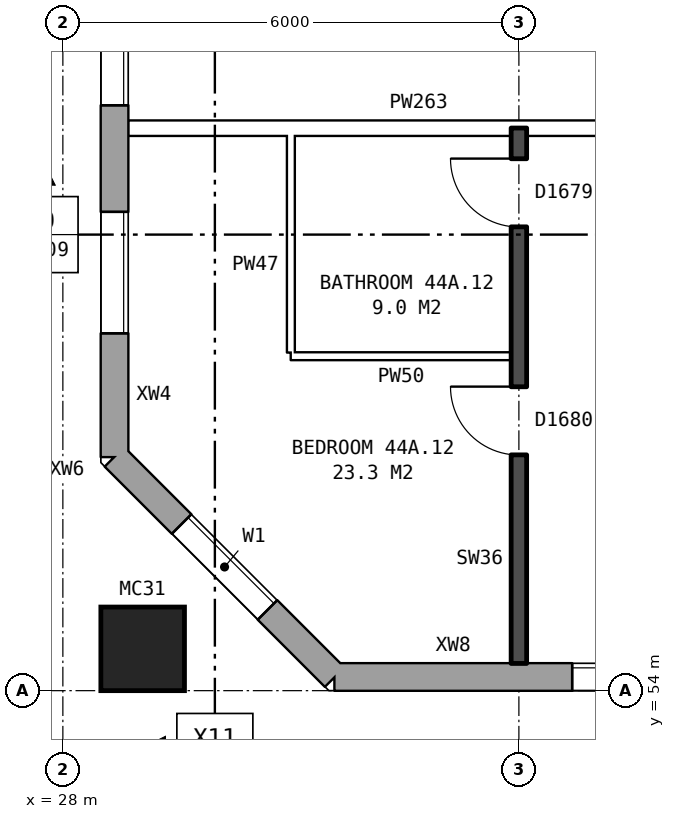
"""IFC4 building model, lengths in metres.
Left out: names, types, materials, properties, quantities, classifications, styles, units other than length and angle.
Written with IfcOpenShell. Run it as: python <this file> out.ifc"""

import sys

from ifc_helpers import new_model, si_unit, direction, frame, frame_2d, origin, origin_2d, place, context, subcontext, project, spatial, rectangle, hollow_rectangle, extrude, element, fill, save


model = new_model("IFC4")
c1 = context("Model", 3, precision=1e-05, world=origin(), true_north=direction((0.0, 1.0)))
c2 = subcontext(c1, "Body", "Model", "MODEL_VIEW")
j1 = project(units=[si_unit("LENGTHUNIT", "METRE"), si_unit("PLANEANGLEUNIT", "RADIAN")], contexts=[c1])
p1 = place(None, origin())
s1 = spatial("IfcSite", under=j1, at=p1, CompositionType="ELEMENT")
p2 = place(p1, origin())
s2 = spatial("IfcBuilding", under=s1, at=p2, CompositionType="ELEMENT")
p3 = place(p2, frame((0.0, 0.0, 157.8)))
s3 = spatial("IfcBuildingStorey", under=s2, at=p3, CompositionType="ELEMENT", Elevation=157.8)
p4 = place(p3, frame((29.05, 54.55, 0.0), z_axis=(0.0, 0.0, 1.0), x_axis=(1.0, 0.0, 0.0)))
e1 = element("IfcColumn", 1, at=p4, inside=s3, PredefinedType="COLUMN", context=c2, shape_type="SweptSolid", body=[
    extrude(hollow_rectangle(XDim=1.1, YDim=1.1, WallThickness=0.06, at=origin_2d()), origin(), (0.0, 0.0, 1.0), 3.1),
])
p5 = place(p3, frame((28.68, 57.075, 0.0), z_axis=(0.0, 0.0, 1.0), x_axis=(0.707106781187, -0.707106781187, 0.0)))
e2 = element("IfcWall", 2, at=p5, inside=s3, PredefinedType="STANDARD", context=c2, shape_type="SweptSolid", body=[
    extrude(rectangle(XDim=4.094, YDim=0.36, at=frame_2d((2.047, 0.0))), origin(), (0.0, 0.0, 1.0), 2.85),
])
p6 = place(p5, frame((1.247, 0.0, 0.8)))
e3 = element("IfcOpeningElement", 3, at=p6, cuts=e2, PredefinedType="OPENING", context=c2, shape_type="SweptSolid", body=[
    extrude(rectangle(XDim=1.6, YDim=1.8, at=frame_2d((0.8, 0.9))), frame((0.0, 0.19, 0.0), z_axis=(0.0, -1.0, 0.0), x_axis=(1.0, 0.0, 0.0)), (0.0, 0.0, 1.0), 0.38),
])
p7 = place(p3, frame((31.575, 54.18, 0.0), z_axis=(0.0, 0.0, 1.0), x_axis=(1.0, 0.0, 0.0)))
e4 = element("IfcWall", 4, at=p7, inside=s3, PredefinedType="STANDARD", context=c2, shape_type="SweptSolid", body=[
    extrude(rectangle(XDim=41.351, YDim=0.36, at=frame_2d((20.675, 0.0))), origin(), (0.0, 0.0, 1.0), 2.85),
])
p8 = place(p7, frame((3.125, 0.0, 0.8)))
e5 = element("IfcOpeningElement", 5, at=p8, cuts=e4, PredefinedType="OPENING", context=c2, shape_type="SweptSolid", body=[
    extrude(rectangle(XDim=1.6, YDim=1.8, at=frame_2d((0.8, 0.9))), frame((0.0, 0.19, 0.0), z_axis=(0.0, -1.0, 0.0), x_axis=(1.0, 0.0, 0.0)), (0.0, 0.0, 1.0), 0.38),
])
p9 = place(p7, frame((6.125, 0.0, 0.8)))
e6 = element("IfcOpeningElement", 6, at=p9, cuts=e4, PredefinedType="OPENING", context=c2, shape_type="SweptSolid", body=[
    extrude(rectangle(XDim=1.6, YDim=1.8, at=frame_2d((0.8, 0.9))), frame((0.0, 0.19, 0.0), z_axis=(0.0, -1.0, 0.0), x_axis=(1.0, 0.0, 0.0)), (0.0, 0.0, 1.0), 0.38),
])
p10 = place(p7, frame((8.625, 0.0, 0.8)))
e7 = element("IfcOpeningElement", 7, at=p10, cuts=e4, PredefinedType="OPENING", context=c2, shape_type="SweptSolid", body=[
    extrude(rectangle(XDim=1.0, YDim=1.8, at=frame_2d((0.5, 0.9))), frame((0.0, 0.19, 0.0), z_axis=(0.0, -1.0, 0.0), x_axis=(1.0, 0.0, 0.0)), (0.0, 0.0, 1.0), 0.38),
])
p11 = place(p7, frame((9.925, 0.0, 1.6)))
e8 = element("IfcOpeningElement", 8, at=p11, cuts=e4, PredefinedType="OPENING", context=c2, shape_type="SweptSolid", body=[
    extrude(rectangle(XDim=0.8, YDim=0.9, at=frame_2d((0.4, 0.45))), frame((0.0, 0.19, 0.0), z_axis=(0.0, -1.0, 0.0), x_axis=(1.0, 0.0, 0.0)), (0.0, 0.0, 1.0), 0.38),
])
p12 = place(p7, frame((15.125, 0.0, 0.8)))
e9 = element("IfcOpeningElement", 9, at=p12, cuts=e4, PredefinedType="OPENING", context=c2, shape_type="SweptSolid", body=[
    extrude(rectangle(XDim=1.6, YDim=1.8, at=frame_2d((0.8, 0.9))), frame((0.0, 0.19, 0.0), z_axis=(0.0, -1.0, 0.0), x_axis=(1.0, 0.0, 0.0)), (0.0, 0.0, 1.0), 0.38),
])
p13 = place(p7, frame((18.125, 0.0, 0.8)))
e10 = element("IfcOpeningElement", 10, at=p13, cuts=e4, PredefinedType="OPENING", context=c2, shape_type="SweptSolid", body=[
    extrude(rectangle(XDim=1.6, YDim=1.8, at=frame_2d((0.8, 0.9))), frame((0.0, 0.19, 0.0), z_axis=(0.0, -1.0, 0.0), x_axis=(1.0, 0.0, 0.0)), (0.0, 0.0, 1.0), 0.38),
])
p14 = place(p7, frame((21.125, 0.0, 0.8)))
e11 = element("IfcOpeningElement", 11, at=p14, cuts=e4, PredefinedType="OPENING", context=c2, shape_type="SweptSolid", body=[
    extrude(rectangle(XDim=1.6, YDim=1.8, at=frame_2d((0.8, 0.9))), frame((0.0, 0.19, 0.0), z_axis=(0.0, -1.0, 0.0), x_axis=(1.0, 0.0, 0.0)), (0.0, 0.0, 1.0), 0.38),
])
p15 = place(p7, frame((24.125, 0.0, 0.8)))
e12 = element("IfcOpeningElement", 12, at=p15, cuts=e4, PredefinedType="OPENING", context=c2, shape_type="SweptSolid", body=[
    extrude(rectangle(XDim=1.6, YDim=1.8, at=frame_2d((0.8, 0.9))), frame((0.0, 0.19, 0.0), z_axis=(0.0, -1.0, 0.0), x_axis=(1.0, 0.0, 0.0)), (0.0, 0.0, 1.0), 0.38),
])
p16 = place(p7, frame((26.625, 0.0, 0.8)))
e13 = element("IfcOpeningElement", 13, at=p16, cuts=e4, PredefinedType="OPENING", context=c2, shape_type="SweptSolid", body=[
    extrude(rectangle(XDim=1.4, YDim=1.8, at=frame_2d((0.7, 0.9))), frame((0.0, 0.19, 0.0), z_axis=(0.0, -1.0, 0.0), x_axis=(1.0, 0.0, 0.0)), (0.0, 0.0, 1.0), 0.38),
])
p17 = place(p7, frame((30.475, 0.0, 1.7)))
e14 = element("IfcOpeningElement", 14, at=p17, cuts=e4, PredefinedType="OPENING", context=c2, shape_type="SweptSolid", body=[
    extrude(rectangle(XDim=0.8, YDim=0.9, at=frame_2d((0.4, 0.45))), frame((0.0, 0.19, 0.0), z_axis=(0.0, -1.0, 0.0), x_axis=(1.0, 0.0, 0.0)), (0.0, 0.0, 1.0), 0.38),
])
p18 = place(p7, frame((33.125, 0.0, 0.8)))
e15 = element("IfcOpeningElement", 15, at=p18, cuts=e4, PredefinedType="OPENING", context=c2, shape_type="SweptSolid", body=[
    extrude(rectangle(XDim=1.6, YDim=1.8, at=frame_2d((0.8, 0.9))), frame((0.0, 0.19, 0.0), z_axis=(0.0, -1.0, 0.0), x_axis=(1.0, 0.0, 0.0)), (0.0, 0.0, 1.0), 0.38),
])
p19 = place(p7, frame((36.125, 0.0, 0.8)))
e16 = element("IfcOpeningElement", 16, at=p19, cuts=e4, PredefinedType="OPENING", context=c2, shape_type="SweptSolid", body=[
    extrude(rectangle(XDim=1.6, YDim=1.8, at=frame_2d((0.8, 0.9))), frame((0.0, 0.19, 0.0), z_axis=(0.0, -1.0, 0.0), x_axis=(1.0, 0.0, 0.0)), (0.0, 0.0, 1.0), 0.38),
])
p20 = place(p7, frame((39.125, 0.0, 0.8)))
e17 = element("IfcOpeningElement", 17, at=p20, cuts=e4, PredefinedType="OPENING", context=c2, shape_type="SweptSolid", body=[
    extrude(rectangle(XDim=1.6, YDim=1.8, at=frame_2d((0.8, 0.9))), frame((0.0, 0.19, 0.0), z_axis=(0.0, -1.0, 0.0), x_axis=(1.0, 0.0, 0.0)), (0.0, 0.0, 1.0), 0.38),
])
p21 = place(p7, frame((12.125, 0.0, 0.8)))
e18 = element("IfcOpeningElement", 18, at=p21, cuts=e4, PredefinedType="OPENING", context=c2, shape_type="SweptSolid", body=[
    extrude(rectangle(XDim=1.0, YDim=0.9, at=frame_2d((0.5, 0.45))), frame((0.0, 0.19, 0.0), z_axis=(0.0, -1.0, 0.0), x_axis=(1.0, 0.0, 0.0)), (0.0, 0.0, 1.0), 0.38),
])
p22 = place(p7, frame((13.425, 0.0, 0.8)))
e19 = element("IfcOpeningElement", 19, at=p22, cuts=e4, PredefinedType="OPENING", context=c2, shape_type="SweptSolid", body=[
    extrude(rectangle(XDim=0.8, YDim=1.8, at=frame_2d((0.4, 0.9))), frame((0.0, 0.19, 0.0), z_axis=(0.0, -1.0, 0.0), x_axis=(1.0, 0.0, 0.0)), (0.0, 0.0, 1.0), 0.38),
])
p23 = place(p7, frame((28.325, 0.0, 0.8)))
e20 = element("IfcOpeningElement", 20, at=p23, cuts=e4, PredefinedType="OPENING", context=c2, shape_type="SweptSolid", body=[
    extrude(rectangle(XDim=0.8, YDim=0.9, at=frame_2d((0.4, 0.45))), frame((0.0, 0.19, 0.0), z_axis=(0.0, -1.0, 0.0), x_axis=(1.0, 0.0, 0.0)), (0.0, 0.0, 1.0), 0.38),
])
p24 = place(p7, frame((31.625, 0.0, 0.8)))
e21 = element("IfcOpeningElement", 21, at=p24, cuts=e4, PredefinedType="OPENING", context=c2, shape_type="SweptSolid", body=[
    extrude(rectangle(XDim=0.6, YDim=1.8, at=frame_2d((0.3, 0.9))), frame((0.0, 0.19, 0.0), z_axis=(0.0, -1.0, 0.0), x_axis=(1.0, 0.0, 0.0)), (0.0, 0.0, 1.0), 0.38),
])
p25 = place(p3, frame((28.68, 82.925, 0.0), z_axis=(0.0, 0.0, 1.0), x_axis=(0.0, -1.0, 0.0)))
e22 = element("IfcWall", 22, at=p25, inside=s3, PredefinedType="STANDARD", context=c2, shape_type="SweptSolid", body=[
    extrude(rectangle(XDim=25.851, YDim=0.36, at=frame_2d((12.925, 0.0))), origin(), (0.0, 0.0, 1.0), 2.85),
])
p26 = place(p25, frame((1.625, 0.0, 0.8)))
e23 = element("IfcOpeningElement", 23, at=p26, cuts=e22, PredefinedType="OPENING", context=c2, shape_type="SweptSolid", body=[
    extrude(rectangle(XDim=1.6, YDim=1.8, at=frame_2d((0.8, 0.9))), frame((0.0, 0.19, 0.0), z_axis=(0.0, -1.0, 0.0), x_axis=(1.0, 0.0, 0.0)), (0.0, 0.0, 1.0), 0.38),
])
p27 = place(p25, frame((4.625, 0.0, 0.8)))
e24 = element("IfcOpeningElement", 24, at=p27, cuts=e22, PredefinedType="OPENING", context=c2, shape_type="SweptSolid", body=[
    extrude(rectangle(XDim=1.6, YDim=1.8, at=frame_2d((0.8, 0.9))), frame((0.0, 0.19, 0.0), z_axis=(0.0, -1.0, 0.0), x_axis=(1.0, 0.0, 0.0)), (0.0, 0.0, 1.0), 0.38),
])
p28 = place(p25, frame((6.525, 0.0, 0.8)))
e25 = element("IfcOpeningElement", 25, at=p28, cuts=e22, PredefinedType="OPENING", context=c2, shape_type="SweptSolid", body=[
    extrude(rectangle(XDim=1.6, YDim=1.5, at=frame_2d((0.8, 0.75))), frame((0.0, 0.19, 0.0), z_axis=(0.0, -1.0, 0.0), x_axis=(1.0, 0.0, 0.0)), (0.0, 0.0, 1.0), 0.38),
])
p29 = place(p25, frame((8.425, 0.0, 0.8)))
e26 = element("IfcOpeningElement", 26, at=p29, cuts=e22, PredefinedType="OPENING", context=c2, shape_type="SweptSolid", body=[
    extrude(rectangle(XDim=0.6, YDim=0.9, at=frame_2d((0.3, 0.45))), frame((0.0, 0.19, 0.0), z_axis=(0.0, -1.0, 0.0), x_axis=(1.0, 0.0, 0.0)), (0.0, 0.0, 1.0), 0.38),
])
p30 = place(p25, frame((10.225, 0.0, 1.7)))
e27 = element("IfcOpeningElement", 27, at=p30, cuts=e22, PredefinedType="OPENING", context=c2, shape_type="SweptSolid", body=[
    extrude(rectangle(XDim=1.2, YDim=0.9, at=frame_2d((0.6, 0.45))), frame((0.0, 0.19, 0.0), z_axis=(0.0, -1.0, 0.0), x_axis=(1.0, 0.0, 0.0)), (0.0, 0.0, 1.0), 0.38),
])
p31 = place(p25, frame((11.725, 0.0, 0.8)))
e28 = element("IfcOpeningElement", 28, at=p31, cuts=e22, PredefinedType="OPENING", context=c2, shape_type="SweptSolid", body=[
    extrude(rectangle(XDim=1.6, YDim=1.8, at=frame_2d((0.8, 0.9))), frame((0.0, 0.19, 0.0), z_axis=(0.0, -1.0, 0.0), x_axis=(1.0, 0.0, 0.0)), (0.0, 0.0, 1.0), 0.38),
])
p32 = place(p25, frame((19.625, 0.0, 0.8)))
e29 = element("IfcOpeningElement", 29, at=p32, cuts=e22, PredefinedType="OPENING", context=c2, shape_type="SweptSolid", body=[
    extrude(rectangle(XDim=1.6, YDim=1.8, at=frame_2d((0.8, 0.9))), frame((0.0, 0.19, 0.0), z_axis=(0.0, -1.0, 0.0), x_axis=(1.0, 0.0, 0.0)), (0.0, 0.0, 1.0), 0.38),
])
p33 = place(p25, frame((22.625, 0.0, 0.8)))
e30 = element("IfcOpeningElement", 30, at=p33, cuts=e22, PredefinedType="OPENING", context=c2, shape_type="SweptSolid", body=[
    extrude(rectangle(XDim=1.6, YDim=1.8, at=frame_2d((0.8, 0.9))), frame((0.0, 0.19, 0.0), z_axis=(0.0, -1.0, 0.0), x_axis=(1.0, 0.0, 0.0)), (0.0, 0.0, 1.0), 0.38),
])
p34 = place(p25, frame((13.625, 0.0, 1.1)))
e31 = element("IfcOpeningElement", 31, at=p34, cuts=e22, PredefinedType="OPENING", context=c2, shape_type="SweptSolid", body=[
    extrude(rectangle(XDim=1.0, YDim=1.5, at=frame_2d((0.5, 0.75))), frame((0.0, 0.19, 0.0), z_axis=(0.0, -1.0, 0.0), x_axis=(1.0, 0.0, 0.0)), (0.0, 0.0, 1.0), 0.38),
])
p35 = place(p25, frame((14.925, 0.0, 1.7)))
e32 = element("IfcOpeningElement", 32, at=p35, cuts=e22, PredefinedType="OPENING", context=c2, shape_type="SweptSolid", body=[
    extrude(rectangle(XDim=0.6, YDim=0.9, at=frame_2d((0.3, 0.45))), frame((0.0, 0.19, 0.0), z_axis=(0.0, -1.0, 0.0), x_axis=(1.0, 0.0, 0.0)), (0.0, 0.0, 1.0), 0.38),
])
p36 = place(p25, frame((16.675, 0.0, 0.8)))
e33 = element("IfcOpeningElement", 33, at=p36, cuts=e22, PredefinedType="OPENING", context=c2, shape_type="SweptSolid", body=[
    extrude(rectangle(XDim=0.6, YDim=0.9, at=frame_2d((0.3, 0.45))), frame((0.0, 0.19, 0.0), z_axis=(0.0, -1.0, 0.0), x_axis=(1.0, 0.0, 0.0)), (0.0, 0.0, 1.0), 0.38),
])
p37 = place(p25, frame((17.675, 0.0, 0.8)))
e34 = element("IfcOpeningElement", 34, at=p37, cuts=e22, PredefinedType="OPENING", context=c2, shape_type="SweptSolid", body=[
    extrude(rectangle(XDim=1.6, YDim=1.5, at=frame_2d((0.8, 0.75))), frame((0.0, 0.19, 0.0), z_axis=(0.0, -1.0, 0.0), x_axis=(1.0, 0.0, 0.0)), (0.0, 0.0, 1.0), 0.38),
])
p38 = place(p3, frame((31.0, 58.4, 0.0), z_axis=(0.0, 0.0, 1.0), x_axis=(1.0, 0.0, 0.0)))
e35 = element("IfcWall", 35, at=p38, inside=s3, PredefinedType="PARTITIONING", context=c2, shape_type="SweptSolid", body=[
    extrude(rectangle(XDim=2.9, YDim=0.1, at=frame_2d((1.45, 0.0))), origin(), (0.0, 0.0, 1.0), 2.85),
])
p39 = place(p3, frame((28.86, 61.4, 0.0), z_axis=(0.0, 0.0, 1.0), x_axis=(1.0, 0.0, 0.0)))
e36 = element("IfcWall", 36, at=p39, inside=s3, PredefinedType="PARTITIONING", context=c2, shape_type="SweptSolid", body=[
    extrude(rectangle(XDim=17.04, YDim=0.2, at=frame_2d((8.52, 0.0))), origin(), (0.0, 0.0, 1.0), 2.85),
])
p40 = place(p39, frame((14.59, 0.0, 0.0)))
e37 = element("IfcOpeningElement", 37, at=p40, cuts=e36, PredefinedType="OPENING", context=c2, shape_type="SweptSolid", body=[
    extrude(rectangle(XDim=1.0, YDim=2.1, at=frame_2d((0.5, 1.05))), frame((0.0, 0.11, 0.0), z_axis=(0.0, -1.0, 0.0), x_axis=(1.0, 0.0, 0.0)), (0.0, 0.0, 1.0), 0.22),
])
p41 = place(p39, frame((7.64, 0.0, 0.0)))
e38 = element("IfcOpeningElement", 38, at=p41, cuts=e36, PredefinedType="OPENING", context=c2, shape_type="SweptSolid", body=[
    extrude(rectangle(XDim=1.0, YDim=2.1, at=frame_2d((0.5, 1.05))), frame((0.0, 0.11, 0.0), z_axis=(0.0, -1.0, 0.0), x_axis=(1.0, 0.0, 0.0)), (0.0, 0.0, 1.0), 0.22),
])
p42 = place(p3, frame((31.0, 58.45, 0.0), z_axis=(0.0, 0.0, 1.0), x_axis=(0.0, 1.0, 0.0)))
e39 = element("IfcWall", 39, at=p42, inside=s3, PredefinedType="PARTITIONING", context=c2, shape_type="SweptSolid", body=[
    extrude(rectangle(XDim=2.85, YDim=0.1, at=frame_2d((1.425, 0.0))), origin(), (0.0, 0.0, 1.0), 2.85),
])
p43 = place(p3, frame((34.0, 54.36, 0.0), z_axis=(0.0, 0.0, 1.0), x_axis=(0.0, 1.0, 0.0)))
e40 = element("IfcWall", 40, at=p43, inside=s3, PredefinedType="SOLIDWALL", context=c2, shape_type="SweptSolid", body=[
    extrude(rectangle(XDim=7.04, YDim=0.2, at=frame_2d((3.52, 0.0))), origin(), (0.0, 0.0, 1.0), 2.85),
])
p44 = place(p43, frame((2.74, 0.0, 0.0)))
e41 = element("IfcOpeningElement", 41, at=p44, cuts=e40, PredefinedType="OPENING", context=c2, shape_type="SweptSolid", body=[
    extrude(rectangle(XDim=0.9, YDim=2.1, at=frame_2d((0.45, 1.05))), frame((0.0, 0.11, 0.0), z_axis=(0.0, -1.0, 0.0), x_axis=(1.0, 0.0, 0.0)), (0.0, 0.0, 1.0), 0.22),
])
p45 = place(p43, frame((5.74, 0.0, 0.0)))
e42 = element("IfcOpeningElement", 42, at=p45, cuts=e40, PredefinedType="OPENING", context=c2, shape_type="SweptSolid", body=[
    extrude(rectangle(XDim=0.9, YDim=2.1, at=frame_2d((0.45, 1.05))), frame((0.0, 0.11, 0.0), z_axis=(0.0, -1.0, 0.0), x_axis=(1.0, 0.0, 0.0)), (0.0, 0.0, 1.0), 0.22),
])
p46 = place(p6, origin())
e43 = element("IfcWindow", 43, at=p46, inside=s3, PartitioningType="SINGLE_PANEL", PredefinedType="WINDOW", context=c2, shape_type="SweptSolid", body=[
    extrude(rectangle(XDim=1.6, YDim=1.8, at=frame_2d((0.8, 0.9))), frame((0.0, 0.15, 0.0), z_axis=(0.0, -1.0, 0.0), x_axis=(1.0, 0.0, 0.0)), (0.0, 0.0, 1.0), 0.06),
])
fill(e3, e43)
p47 = place(p8, origin())
e44 = element("IfcWindow", 44, at=p47, inside=s3, PartitioningType="SINGLE_PANEL", PredefinedType="WINDOW", context=c2, shape_type="SweptSolid", body=[
    extrude(rectangle(XDim=1.6, YDim=1.8, at=frame_2d((0.8, 0.9))), frame((0.0, 0.15, 0.0), z_axis=(0.0, -1.0, 0.0), x_axis=(1.0, 0.0, 0.0)), (0.0, 0.0, 1.0), 0.06),
])
fill(e5, e44)
p48 = place(p32, origin())
e45 = element("IfcWindow", 45, at=p48, inside=s3, PartitioningType="SINGLE_PANEL", PredefinedType="WINDOW", context=c2, shape_type="SweptSolid", body=[
    extrude(rectangle(XDim=1.6, YDim=1.8, at=frame_2d((0.8, 0.9))), frame((0.0, 0.15, 0.0), z_axis=(0.0, -1.0, 0.0), x_axis=(1.0, 0.0, 0.0)), (0.0, 0.0, 1.0), 0.06),
])
fill(e29, e45)
p49 = place(p33, origin())
e46 = element("IfcWindow", 46, at=p49, inside=s3, PartitioningType="SINGLE_PANEL", PredefinedType="WINDOW", context=c2, shape_type="SweptSolid", body=[
    extrude(rectangle(XDim=1.6, YDim=1.8, at=frame_2d((0.8, 0.9))), frame((0.0, 0.15, 0.0), z_axis=(0.0, -1.0, 0.0), x_axis=(1.0, 0.0, 0.0)), (0.0, 0.0, 1.0), 0.06),
])
fill(e30, e46)
p50 = place(p44, origin())
e47 = element("IfcDoor", 47, at=p50, inside=s3, OperationType="SINGLE_SWING_RIGHT", PredefinedType="DOOR", context=c2, shape_type="SweptSolid", body=[
    extrude(rectangle(XDim=0.9, YDim=2.1, at=frame_2d((0.45, 1.05))), frame((0.0, 0.025, 0.0), z_axis=(0.0, -1.0, 0.0), x_axis=(1.0, 0.0, 0.0)), (0.0, 0.0, 1.0), 0.05),
])
fill(e41, e47)
p51 = place(p45, origin())
e48 = element("IfcDoor", 48, at=p51, inside=s3, OperationType="SINGLE_SWING_RIGHT", PredefinedType="DOOR", context=c2, shape_type="SweptSolid", body=[
    extrude(rectangle(XDim=0.9, YDim=2.1, at=frame_2d((0.45, 1.05))), frame((0.0, 0.025, 0.0), z_axis=(0.0, -1.0, 0.0), x_axis=(1.0, 0.0, 0.0)), (0.0, 0.0, 1.0), 0.05),
])
fill(e42, e48)
save(model, sys.argv[1])
